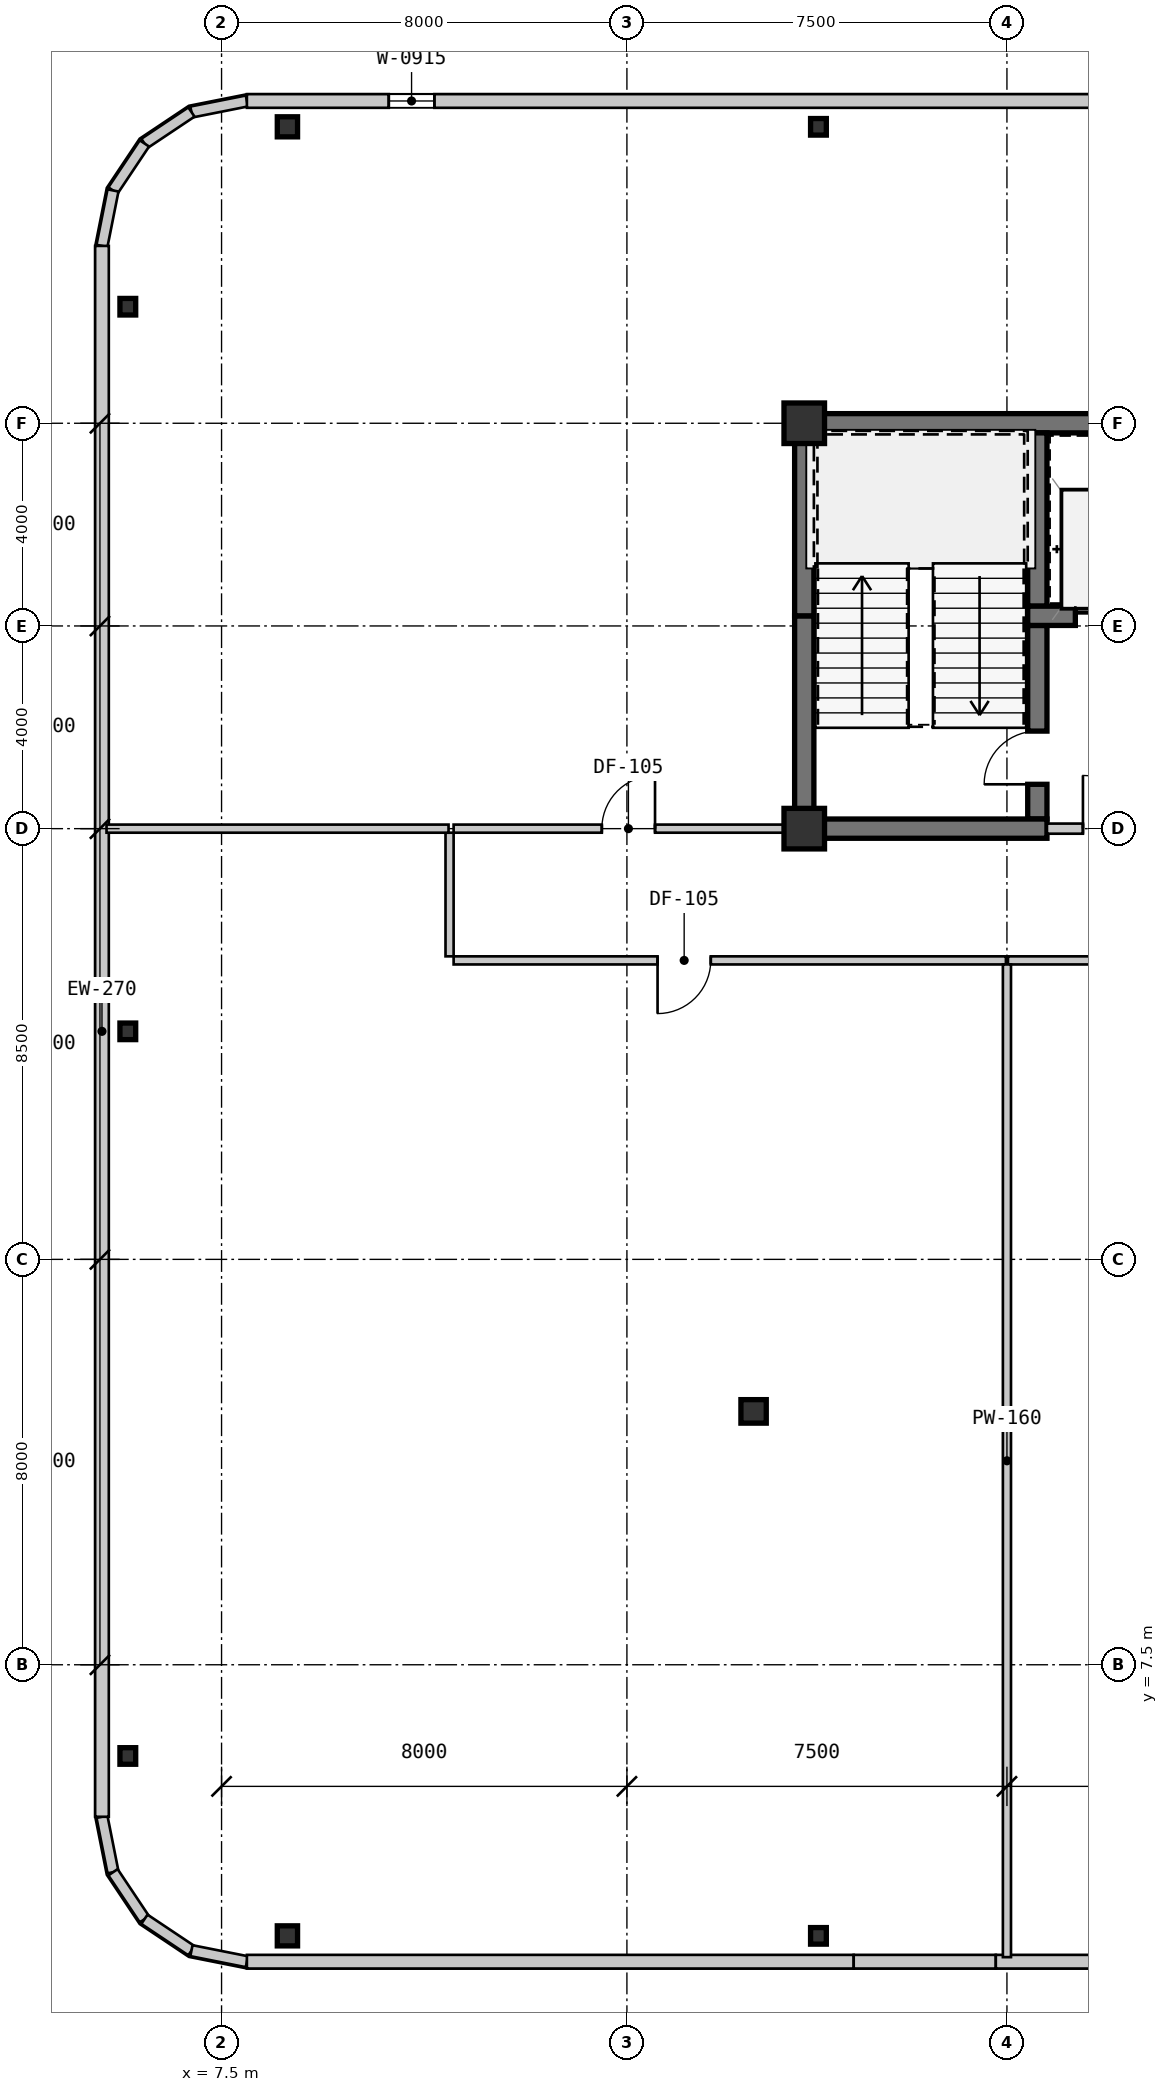
"""IFC4 building model, lengths in metres.
Left out: names, types, materials, properties, quantities, classifications, styles, units other than length and angle.
Written with IfcOpenShell. Run it as: python <this file> out.ifc"""

import sys

from ifc_helpers import new_model, si_unit, direction, frame, frame_2d, origin, origin_2d, place, context, subcontext, project, spatial, rectangle, i_section, extrude, source, transform, mapped, element, fill, save


model = new_model("IFC4")
c1 = context("Model", 3, precision=1e-05, world=origin(), true_north=direction((0.0, 1.0)))
c2 = subcontext(c1, "Body", "Model", "MODEL_VIEW")
j1 = project(units=[si_unit("LENGTHUNIT", "METRE"), si_unit("PLANEANGLEUNIT", "RADIAN")], contexts=[c1])
p1 = place(None, origin())
s1 = spatial("IfcSite", under=j1, at=p1, CompositionType="ELEMENT")
p2 = place(p1, origin())
s2 = spatial("IfcBuilding", under=s1, at=p2, CompositionType="ELEMENT")
p3 = place(p2, frame((0.0, 0.0, 60.9)))
s3 = spatial("IfcBuildingStorey", under=s2, at=p3, CompositionType="ELEMENT", Elevation=60.9)
m1 = source(origin(), c2, "Body", "SweptSolid", [
    extrude(rectangle(XDim=0.8, YDim=0.8, at=origin_2d()), origin(), (0.0, 0.0, 1.0), 4.2),
])
for number, where, z_axis, x_axis in (
    (1, (19.0, 24.0, 0.0), (0.0, 0.0, 1.0), (1.0, 0.0, 0.0)),
    (2, (19.0, 32.0, 0.0), (0.0, 0.0, 1.0), (1.0, 0.0, 0.0)),
):
    element("IfcColumn", number, at=place(p3, frame(where, z_axis=z_axis, x_axis=x_axis)), inside=s3, PredefinedType="COLUMN", context=c2, shape_type="MappedRepresentation", body=[
        mapped(m1, transform((0.0, 0.0, 0.0), scale=1.0)),
    ])
m2 = source(origin(), c2, "Body", "SweptSolid", [
    extrude(i_section(OverallWidth=0.5, OverallDepth=0.464, WebThickness=0.022, FlangeThickness=0.034, at=origin_2d()), origin(), (0.0, 0.0, 1.0), 4.2),
])
p4 = place(p3, frame((18.0, 12.5, 0.0), z_axis=(0.0, 0.0, 1.0), x_axis=(1.0, 0.0, 0.0)))
e3 = element("IfcColumn", 3, at=p4, inside=s3, PredefinedType="COLUMN", context=c2, shape_type="MappedRepresentation", body=[
    mapped(m2, transform((0.0, 0.0, 0.0), scale=1.0)),
])
m3 = source(origin(), c2, "Body", "SweptSolid", [
    extrude(i_section(OverallWidth=0.4, OverallDepth=0.396, WebThickness=0.022, FlangeThickness=0.034, at=origin_2d()), origin(), (0.0, 0.0, 1.0), 4.2),
])
p5 = place(p3, frame((8.8, 2.15, 0.0), z_axis=(0.0, 0.0, 1.0), x_axis=(1.0, 0.0, 0.0)))
e4 = element("IfcColumn", 4, at=p5, inside=s3, PredefinedType="COLUMN", context=c2, shape_type="MappedRepresentation", body=[
    mapped(m3, transform((0.0, 0.0, 0.0), scale=1.0)),
])
m4 = source(origin(), c2, "Body", "SweptSolid", [
    extrude(i_section(OverallWidth=0.311, OverallDepth=0.327, WebThickness=0.016, FlangeThickness=0.025, at=origin_2d()), origin(), (0.0, 0.0, 1.0), 4.2),
])
p6 = place(p3, frame((19.28, 2.15, 0.0), z_axis=(0.0, 0.0, 1.0), x_axis=(1.0, 0.0, 0.0)))
e5 = element("IfcColumn", 5, at=p6, inside=s3, PredefinedType="COLUMN", context=c2, shape_type="MappedRepresentation", body=[
    mapped(m4, transform((0.0, 0.0, 0.0), scale=1.0)),
])
p7 = place(p3, frame((8.8, 37.85, 0.0), z_axis=(0.0, 0.0, 1.0), x_axis=(1.0, 0.0, 0.0)))
e6 = element("IfcColumn", 6, at=p7, inside=s3, PredefinedType="COLUMN", context=c2, shape_type="MappedRepresentation", body=[
    mapped(m3, transform((0.0, 0.0, 0.0), scale=1.0)),
])
for number, where, z_axis, x_axis in (
    (7, (19.28, 37.85, 0.0), (0.0, 0.0, 1.0), (1.0, 0.0, 0.0)),
    (8, (5.65, 5.7, 0.0), (0.0, 0.0, 1.0), (1.0, 0.0, 0.0)),
    (9, (5.65, 20.0, 0.0), (0.0, 0.0, 1.0), (1.0, 0.0, 0.0)),
    (10, (5.65, 34.3, 0.0), (0.0, 0.0, 1.0), (1.0, 0.0, 0.0)),
):
    element("IfcColumn", number, at=place(p3, frame(where, z_axis=z_axis, x_axis=x_axis)), inside=s3, PredefinedType="COLUMN", context=c2, shape_type="MappedRepresentation", body=[
        mapped(m4, transform((0.0, 0.0, 0.0), scale=1.0)),
    ])
m5 = source(origin(), c2, "Body", "SweptSolid", [
    extrude(rectangle(XDim=1.116, YDim=0.22, at=frame_2d((0.558, 0.0))), origin(), (0.0, 0.0, 1.0), 3.78),
])
for number, where, z_axis, x_axis in (
    (11, (8.0, 38.36, 0.0), (0.0, 0.0, 1.0), (-0.981, -0.195, 0.0)),
    (12, (6.906, 38.142, 0.0), (0.0, 0.0, 1.0), (-0.831, -0.556, 0.0)),
    (13, (5.978, 37.522, 0.0), (0.0, 0.0, 1.0), (-0.556, -0.831, 0.0)),
    (14, (5.358, 36.594, 0.0), (0.0, 0.0, 1.0), (-0.195, -0.981, 0.0)),
    (15, (5.14, 4.5, 0.0), (0.0, 0.0, 1.0), (0.195, -0.981, 0.0)),
    (16, (5.358, 3.406, 0.0), (0.0, 0.0, 1.0), (0.556, -0.831, 0.0)),
    (17, (5.978, 2.478, 0.0), (0.0, 0.0, 1.0), (0.831, -0.556, 0.0)),
    (18, (6.906, 1.858, 0.0), (0.0, 0.0, 1.0), (0.981, -0.195, 0.0)),
):
    element("IfcWall", number, at=place(p3, frame(where, z_axis=z_axis, x_axis=x_axis)), inside=s3, PredefinedType="SOLIDWALL", context=c2, shape_type="MappedRepresentation", body=[
        mapped(m5, transform((0.0, 0.0, 0.0), scale=1.0)),
    ])
m6 = source(origin(), c2, "Body", "SweptSolid", [
    extrude(rectangle(XDim=11.976, YDim=0.27, at=frame_2d((5.988, 0.0))), origin(), (0.0, 0.0, 1.0), 3.78),
])
p8 = place(p3, frame((8.0, 1.64, 0.0), z_axis=(0.0, 0.0, 1.0), x_axis=(1.0, 0.0, 0.0)))
e19 = element("IfcWall", 19, at=p8, inside=s3, PredefinedType="SOLIDWALL", context=c2, shape_type="MappedRepresentation", body=[
    mapped(m6, transform((0.0, 0.0, 0.0), scale=1.0)),
])
m7 = source(origin(), c2, "Body", "SweptSolid", [
    extrude(rectangle(XDim=2.804, YDim=0.27, at=frame_2d((1.402, 0.0))), origin(), (0.0, 0.0, 1.0), 2.756),
])
p9 = place(p3, frame((19.976, 1.64, 0.0), z_axis=(0.0, 0.0, 1.0), x_axis=(1.0, 0.0, 0.0)))
e20 = element("IfcWall", 20, at=p9, inside=s3, PredefinedType="SOLIDWALL", context=c2, shape_type="MappedRepresentation", body=[
    mapped(m7, transform((0.0, 0.0, 0.0), scale=1.0)),
])
m8 = source(origin(), c2, "Body", "SweptSolid", [
    extrude(rectangle(XDim=3.333, YDim=0.27, at=frame_2d((1.667, 0.0))), origin(), (0.0, 0.0, 1.0), 3.78),
])
p10 = place(p3, frame((22.781, 1.64, 0.0), z_axis=(0.0, 0.0, 1.0), x_axis=(1.0, 0.0, 0.0)))
e21 = element("IfcWall", 21, at=p10, inside=s3, PredefinedType="SOLIDWALL", context=c2, shape_type="MappedRepresentation", body=[
    mapped(m8, transform((0.0, 0.0, 0.0), scale=1.0)),
])
m9 = source(origin(), c2, "Body", "SweptSolid", [
    extrude(rectangle(XDim=54.0, YDim=0.27, at=frame_2d((27.0, 0.0))), origin(), (0.0, 0.0, 1.0), 3.78),
])
p11 = place(p3, frame((62.0, 38.36, 0.0), z_axis=(0.0, 0.0, 1.0), x_axis=(-1.0, 0.0, 0.0)))
e22 = element("IfcWall", 22, at=p11, inside=s3, PredefinedType="SOLIDWALL", context=c2, shape_type="MappedRepresentation", body=[
    mapped(m9, transform((0.0, 0.0, 0.0), scale=1.0)),
])
m10 = source(origin(), c2, "Body", "SweptSolid", [
    extrude(rectangle(XDim=0.9, YDim=1.5, at=frame_2d((0.45, 0.75))), frame((0.0, 0.145, 0.0), z_axis=(0.0, -1.0, 0.0), x_axis=(1.0, 0.0, 0.0)), (0.0, 0.0, 1.0), 0.29),
])
p12 = place(p11, frame((2.8, 0.0, 0.7)))
e23 = element("IfcOpeningElement", 23, at=p12, cuts=e22, PredefinedType="OPENING", context=c2, shape_type="MappedRepresentation", body=[
    mapped(m10, transform((0.0, 0.0, 0.0), scale=1.0)),
])
p13 = place(p11, frame((50.3, 0.0, 1.5)))
e24 = element("IfcOpeningElement", 24, at=p13, cuts=e22, PredefinedType="OPENING", context=c2, shape_type="MappedRepresentation", body=[
    mapped(m10, transform((0.0, 0.0, 0.0), scale=1.0)),
])
m11 = source(origin(), c2, "Body", "SweptSolid", [
    extrude(rectangle(XDim=31.0, YDim=0.27, at=frame_2d((15.5, 0.0))), origin(), (0.0, 0.0, 1.0), 3.78),
])
p14 = place(p3, frame((5.14, 35.5, 0.0), z_axis=(0.0, 0.0, 1.0), x_axis=(0.0, -1.0, 0.0)))
e25 = element("IfcWall", 25, at=p14, inside=s3, PredefinedType="SOLIDWALL", context=c2, shape_type="MappedRepresentation", body=[
    mapped(m11, transform((0.0, 0.0, 0.0), scale=1.0)),
])
m12 = source(origin(), c2, "Body", "SweptSolid", [
    extrude(rectangle(XDim=9.19, YDim=0.38, at=frame_2d((4.595, 0.0))), origin(), (0.0, 0.0, 1.0), 3.78),
])
p15 = place(p3, frame((18.81, 32.0, 0.0), z_axis=(0.0, 0.0, 1.0), x_axis=(1.0, 0.0, 0.0)))
e26 = element("IfcWall", 26, at=p15, inside=s3, PredefinedType="SHEAR", context=c2, shape_type="MappedRepresentation", body=[
    mapped(m12, transform((0.0, 0.0, 0.0), scale=1.0)),
])
m13 = source(origin(), c2, "Body", "SweptSolid", [
    extrude(rectangle(XDim=4.01, YDim=0.38, at=frame_2d((2.005, 0.0))), origin(), (0.0, 0.0, 1.0), 3.78),
])
p16 = place(p3, frame((19.0, 24.19, 0.0), z_axis=(0.0, 0.0, 1.0), x_axis=(0.0, 1.0, 0.0)))
e27 = element("IfcWall", 27, at=p16, inside=s3, PredefinedType="SHEAR", context=c2, shape_type="MappedRepresentation", body=[
    mapped(m13, transform((0.0, 0.0, 0.0), scale=1.0)),
])
m14 = source(origin(), c2, "Body", "SweptSolid", [
    extrude(rectangle(XDim=3.61, YDim=0.38, at=frame_2d((1.805, 0.0))), origin(), (0.0, 0.0, 1.0), 3.78),
])
p17 = place(p3, frame((19.0, 28.2, 0.0), z_axis=(0.0, 0.0, 1.0), x_axis=(0.0, 1.0, 0.0)))
e28 = element("IfcWall", 28, at=p17, inside=s3, PredefinedType="SHEAR", context=c2, shape_type="MappedRepresentation", body=[
    mapped(m14, transform((0.0, 0.0, 0.0), scale=1.0)),
])
m15 = source(origin(), c2, "Body", "SweptSolid", [
    extrude(rectangle(XDim=3.42, YDim=0.38, at=frame_2d((1.71, 0.0))), origin(), (0.0, 0.0, 1.0), 3.78),
])
p18 = place(p3, frame((23.6, 28.39, 0.0), z_axis=(0.0, 0.0, 1.0), x_axis=(0.0, 1.0, 0.0)))
e29 = element("IfcWall", 29, at=p18, inside=s3, PredefinedType="SHEAR", context=c2, shape_type="MappedRepresentation", body=[
    mapped(m15, transform((0.0, 0.0, 0.0), scale=1.0)),
])
m16 = source(origin(), c2, "Body", "SweptSolid", [
    extrude(rectangle(XDim=3.82, YDim=0.38, at=frame_2d((1.91, 0.0))), origin(), (0.0, 0.0, 1.0), 3.78),
])
p19 = place(p3, frame((23.6, 24.19, 0.0), z_axis=(0.0, 0.0, 1.0), x_axis=(0.0, 1.0, 0.0)))
e30 = element("IfcWall", 30, at=p19, inside=s3, PredefinedType="SHEAR", context=c2, shape_type="MappedRepresentation", body=[
    mapped(m16, transform((0.0, 0.0, 0.0), scale=1.0)),
])
m17 = source(origin(), c2, "Body", "SweptSolid", [
    extrude(rectangle(XDim=1.05, YDim=2.1, at=frame_2d((0.525, 1.05))), frame((0.0, 0.2, 0.0), z_axis=(0.0, -1.0, 0.0), x_axis=(1.0, 0.0, 0.0)), (0.0, 0.0, 1.0), 0.4),
])
p20 = place(p19, frame((0.685, 0.0, 0.0)))
e31 = element("IfcOpeningElement", 31, at=p20, cuts=e30, PredefinedType="OPENING", context=c2, shape_type="MappedRepresentation", body=[
    mapped(m17, transform((0.0, 0.0, 0.0), scale=1.0)),
])
m18 = source(origin(), c2, "Body", "SweptSolid", [
    extrude(rectangle(XDim=4.98, YDim=0.38, at=frame_2d((2.49, 0.0))), origin(), (0.0, 0.0, 1.0), 3.78),
])
p21 = place(p3, frame((18.81, 24.0, 0.0), z_axis=(0.0, 0.0, 1.0), x_axis=(1.0, 0.0, 0.0)))
e32 = element("IfcWall", 32, at=p21, inside=s3, PredefinedType="SHEAR", context=c2, shape_type="MappedRepresentation", body=[
    mapped(m18, transform((0.0, 0.0, 0.0), scale=1.0)),
])
m19 = source(origin(), c2, "Body", "SweptSolid", [
    extrude(rectangle(XDim=2.98, YDim=0.38, at=frame_2d((1.49, 0.0))), origin(), (0.0, 0.0, 1.0), 3.78),
])
p22 = place(p3, frame((23.41, 28.2, 0.0), z_axis=(0.0, 0.0, 1.0), x_axis=(1.0, 0.0, 0.0)))
e33 = element("IfcWall", 33, at=p22, inside=s3, PredefinedType="SHEAR", context=c2, shape_type="MappedRepresentation", body=[
    mapped(m19, transform((0.0, 0.0, 0.0), scale=1.0)),
])
m20 = source(origin(), c2, "Body", "SweptSolid", [
    extrude(rectangle(XDim=1.1, YDim=2.15, at=frame_2d((0.55, 1.075))), frame((0.0, 0.2, 0.0), z_axis=(0.0, -1.0, 0.0), x_axis=(1.0, 0.0, 0.0)), (0.0, 0.0, 1.0), 0.4),
])
p23 = place(p22, frame((0.94, 0.0, 0.0)))
e34 = element("IfcOpeningElement", 34, at=p23, cuts=e33, PredefinedType="OPENING", context=c2, shape_type="MappedRepresentation", body=[
    mapped(m20, transform((0.0, 0.0, 0.0), scale=1.0)),
])
m21 = source(origin(), c2, "Body", "SweptSolid", [
    extrude(rectangle(XDim=2.66, YDim=0.2, at=frame_2d((1.33, 0.0))), origin(), (0.0, 0.0, 1.0), 3.32),
])
p24 = place(p3, frame((23.79, 24.0, 0.0), z_axis=(0.0, 0.0, 1.0), x_axis=(1.0, 0.0, 0.0)))
e35 = element("IfcWall", 35, at=p24, inside=s3, PredefinedType="SOLIDWALL", context=c2, shape_type="MappedRepresentation", body=[
    mapped(m21, transform((0.0, 0.0, 0.0), scale=1.0)),
])
m22 = source(origin(), c2, "Body", "SweptSolid", [
    extrude(rectangle(XDim=1.05, YDim=2.1, at=frame_2d((0.525, 1.05))), frame((0.0, 0.11, 0.0), z_axis=(0.0, -1.0, 0.0), x_axis=(1.0, 0.0, 0.0)), (0.0, 0.0, 1.0), 0.22),
])
p25 = place(p24, frame((0.71, 0.0, 0.0)))
e36 = element("IfcOpeningElement", 36, at=p25, cuts=e35, PredefinedType="OPENING", context=c2, shape_type="MappedRepresentation", body=[
    mapped(m22, transform((0.0, 0.0, 0.0), scale=1.0)),
])
m23 = source(origin(), c2, "Body", "SweptSolid", [
    extrude(rectangle(XDim=6.73, YDim=0.16, at=frame_2d((3.365, 0.0))), origin(), (0.0, 0.0, 1.0), 3.78),
])
p26 = place(p3, frame((12.08, 24.0, 0.0), z_axis=(0.0, 0.0, 1.0), x_axis=(1.0, 0.0, 0.0)))
e37 = element("IfcWall", 37, at=p26, inside=s3, PredefinedType="PARTITIONING", context=c2, shape_type="MappedRepresentation", body=[
    mapped(m23, transform((0.0, 0.0, 0.0), scale=1.0)),
])
m24 = source(origin(), c2, "Body", "SweptSolid", [
    extrude(rectangle(XDim=1.05, YDim=2.1, at=frame_2d((0.525, 1.05))), frame((0.0, 0.09, 0.0), z_axis=(0.0, -1.0, 0.0), x_axis=(1.0, 0.0, 0.0)), (0.0, 0.0, 1.0), 0.18),
])
p27 = place(p26, frame((2.925, 0.0, 0.0)))
e38 = element("IfcOpeningElement", 38, at=p27, cuts=e37, PredefinedType="OPENING", context=c2, shape_type="MappedRepresentation", body=[
    mapped(m24, transform((0.0, 0.0, 0.0), scale=1.0)),
])
m25 = source(origin(), c2, "Body", "SweptSolid", [
    extrude(rectangle(XDim=10.9, YDim=0.16, at=frame_2d((5.45, 0.0))), origin(), (0.0, 0.0, 1.0), 3.78),
])
p28 = place(p3, frame((22.98, 21.4, 0.0), z_axis=(0.0, 0.0, 1.0), x_axis=(-1.0, 0.0, 0.0)))
e39 = element("IfcWall", 39, at=p28, inside=s3, PredefinedType="PARTITIONING", context=c2, shape_type="MappedRepresentation", body=[
    mapped(m25, transform((0.0, 0.0, 0.0), scale=1.0)),
])
p29 = place(p28, frame((5.825, 0.0, 0.0)))
e40 = element("IfcOpeningElement", 40, at=p29, cuts=e39, PredefinedType="OPENING", context=c2, shape_type="MappedRepresentation", body=[
    mapped(m24, transform((0.0, 0.0, 0.0), scale=1.0)),
])
m26 = source(origin(), c2, "Body", "SweptSolid", [
    extrude(rectangle(XDim=2.44, YDim=0.16, at=frame_2d((1.22, 0.0))), origin(), (0.0, 0.0, 1.0), 3.78),
])
p30 = place(p3, frame((12.0, 21.48, 0.0), z_axis=(0.0, 0.0, 1.0), x_axis=(0.0, 1.0, 0.0)))
e41 = element("IfcWall", 41, at=p30, inside=s3, PredefinedType="PARTITIONING", context=c2, shape_type="MappedRepresentation", body=[
    mapped(m26, transform((0.0, 0.0, 0.0), scale=1.0)),
])
m27 = source(origin(), c2, "Body", "SweptSolid", [
    extrude(rectangle(XDim=11.959, YDim=0.16, at=frame_2d((5.98, 0.0))), origin(), (0.0, 0.0, 1.0), 3.78),
])
p31 = place(p3, frame((34.98, 21.4, 0.0), z_axis=(0.0, 0.0, 1.0), x_axis=(-1.0, 0.0, 0.0)))
e42 = element("IfcWall", 42, at=p31, inside=s3, PredefinedType="PARTITIONING", context=c2, shape_type="MappedRepresentation", body=[
    mapped(m27, transform((0.0, 0.0, 0.0), scale=1.0)),
])
p32 = place(p31, frame((4.555, 0.0, 0.0)))
e43 = element("IfcOpeningElement", 43, at=p32, cuts=e42, PredefinedType="OPENING", context=c2, shape_type="MappedRepresentation", body=[
    mapped(m24, transform((0.0, 0.0, 0.0), scale=1.0)),
])
m28 = source(origin(), c2, "Body", "SweptSolid", [
    extrude(rectangle(XDim=6.75, YDim=0.16, at=frame_2d((3.375, 0.0))), origin(), (0.0, 0.0, 1.0), 3.78),
])
p33 = place(p3, frame((11.98, 24.0, 0.0), z_axis=(0.0, 0.0, 1.0), x_axis=(-1.0, 0.0, 0.0)))
e44 = element("IfcWall", 44, at=p33, inside=s3, PredefinedType="PARTITIONING", context=c2, shape_type="MappedRepresentation", body=[
    mapped(m28, transform((0.0, 0.0, 0.0), scale=1.0)),
])
m29 = source(origin(), c2, "Body", "SweptSolid", [
    extrude(rectangle(XDim=19.59, YDim=0.16, at=frame_2d((9.795, 0.0))), origin(), (0.0, 0.0, 1.0), 3.78),
])
p34 = place(p3, frame((23.0, 21.32, 0.0), z_axis=(0.0, 0.0, 1.0), x_axis=(0.0, -1.0, 0.0)))
e45 = element("IfcWall", 45, at=p34, inside=s3, PredefinedType="PARTITIONING", context=c2, shape_type="MappedRepresentation", body=[
    mapped(m29, transform((0.0, 0.0, 0.0), scale=1.0)),
])
m30 = source(origin(), c2, "Body", "SweptSolid", [
    extrude(rectangle(XDim=0.9, YDim=1.5, at=frame_2d((0.45, 0.75))), frame((0.0, 0.03, 0.0), z_axis=(0.0, -1.0, 0.0), x_axis=(1.0, 0.0, 0.0)), (0.0, 0.0, 1.0), 0.06),
])
p35 = place(p13, origin())
e46 = element("IfcWindow", 46, at=p35, inside=s3, PartitioningType="SINGLE_PANEL", PredefinedType="WINDOW", context=c2, shape_type="MappedRepresentation", body=[
    mapped(m30, transform((0.0, 0.0, 0.0), scale=1.0)),
])
fill(e24, e46)
m31 = source(origin(), c2, "Body", "SweptSolid", [
    extrude(rectangle(XDim=1.05, YDim=2.1, at=frame_2d((0.525, 1.05))), frame((0.0, 0.025, 0.0), z_axis=(0.0, -1.0, 0.0), x_axis=(1.0, 0.0, 0.0)), (0.0, 0.0, 1.0), 0.05),
])
p36 = place(p20, origin())
e47 = element("IfcDoor", 47, at=p36, inside=s3, OperationType="SINGLE_SWING_LEFT", PredefinedType="DOOR", context=c2, shape_type="MappedRepresentation", body=[
    mapped(m31, transform((0.0, 0.0, 0.0), scale=1.0)),
])
fill(e31, e47)
m32 = source(origin(), c2, "Body", "SweptSolid", [
    extrude(rectangle(XDim=1.1, YDim=2.15, at=frame_2d((0.55, 1.075))), frame((0.0, 0.025, 0.0), z_axis=(0.0, -1.0, 0.0), x_axis=(1.0, 0.0, 0.0)), (0.0, 0.0, 1.0), 0.05),
])
p37 = place(p23, origin())
e48 = element("IfcDoor", 48, at=p37, inside=s3, OperationType="SLIDING_TO_LEFT", PredefinedType="DOOR", context=c2, shape_type="MappedRepresentation", body=[
    mapped(m32, transform((0.0, 0.0, 0.0), scale=1.0)),
])
fill(e34, e48)
p38 = place(p25, origin())
e49 = element("IfcDoor", 49, at=p38, inside=s3, OperationType="SINGLE_SWING_LEFT", PredefinedType="DOOR", context=c2, shape_type="MappedRepresentation", body=[
    mapped(m31, transform((0.0, 0.0, 0.0), scale=1.0)),
])
fill(e36, e49)
p39 = place(p27, origin())
e50 = element("IfcDoor", 50, at=p39, inside=s3, OperationType="SINGLE_SWING_RIGHT", PredefinedType="DOOR", context=c2, shape_type="MappedRepresentation", body=[
    mapped(m31, transform((0.0, 0.0, 0.0), scale=1.0)),
])
fill(e38, e50)
p40 = place(p29, origin())
e51 = element("IfcDoor", 51, at=p40, inside=s3, OperationType="SINGLE_SWING_RIGHT", PredefinedType="DOOR", context=c2, shape_type="MappedRepresentation", body=[
    mapped(m31, transform((0.0, 0.0, 0.0), scale=1.0)),
])
fill(e40, e51)
save(model, sys.argv[1])
